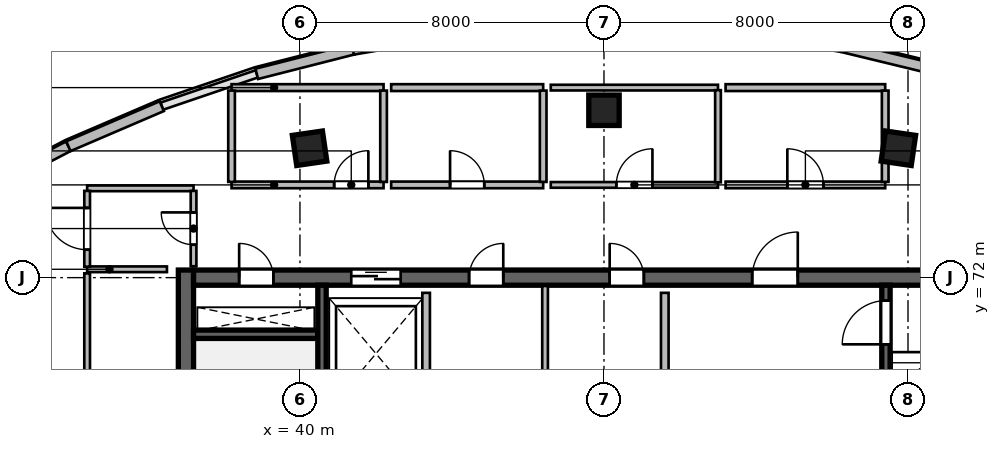
"""IFC4 building model, lengths in metres.
Left out: names, types, materials, properties, quantities, classifications, styles, units other than length and angle.
Written with IfcOpenShell. Run it as: python <this file> out.ifc"""

import sys

from ifc_helpers import new_model, si_unit, direction, frame, frame_2d, origin, origin_2d, place, context, subcontext, project, spatial, rectangle, extrude, source, transform, mapped, element, fill, save


model = new_model("IFC4")
c1 = context("Model", 3, precision=1e-05, world=origin(), true_north=direction((0.0, 1.0)))
c2 = subcontext(c1, "Body", "Model", "MODEL_VIEW")
j1 = project(units=[si_unit("LENGTHUNIT", "METRE"), si_unit("PLANEANGLEUNIT", "RADIAN")], contexts=[c1])
p1 = place(None, origin())
s1 = spatial("IfcSite", under=j1, at=p1, CompositionType="ELEMENT")
p2 = place(p1, origin())
s2 = spatial("IfcBuilding", under=s1, at=p2, CompositionType="ELEMENT")
p3 = place(p2, frame((0.0, 0.0, 295.2)))
s3 = spatial("IfcBuildingStorey", under=s2, at=p3, CompositionType="ELEMENT", Elevation=295.2)
m1 = source(origin(), c2, "Body", "SweptSolid", [
    extrude(rectangle(XDim=12.0, YDim=0.4, at=frame_2d((6.0, 0.0))), origin(), (0.0, 0.0, 1.0), 3.9),
])
p4 = place(p3, frame((37.0, 60.2, 0.0), z_axis=(0.0, 0.0, 1.0), x_axis=(0.0, 1.0, 0.0)))
e1 = element("IfcWall", 1, at=p4, inside=s3, PredefinedType="SHEAR", context=c2, shape_type="MappedRepresentation", body=[
    mapped(m1, transform((0.0, 0.0, 0.0), scale=1.0)),
])
m2 = source(origin(), c2, "Body", "SweptSolid", [
    extrude(rectangle(XDim=21.6, YDim=0.4, at=frame_2d((10.8, 0.0))), origin(), (0.0, 0.0, 1.0), 3.9),
])
p5 = place(p3, frame((37.2, 72.0, 0.0), z_axis=(0.0, 0.0, 1.0), x_axis=(1.0, 0.0, 0.0)))
e2 = element("IfcWall", 2, at=p5, inside=s3, PredefinedType="SHEAR", context=c2, shape_type="MappedRepresentation", body=[
    mapped(m2, transform((0.0, 0.0, 0.0), scale=1.0)),
])
p6 = place(p5, frame((1.2, 0.0, 0.0)))
e3 = element("IfcOpeningElement", 3, at=p6, cuts=e2, PredefinedType="OPENING", context=c2, shape_type="SweptSolid", body=[
    extrude(rectangle(XDim=0.9, YDim=2.1, at=frame_2d((0.45, 1.05))), frame((0.0, 0.21, 0.0), z_axis=(0.0, -1.0, 0.0), x_axis=(1.0, 0.0, 0.0)), (0.0, 0.0, 1.0), 0.42),
])
p7 = place(p5, frame((14.7, 0.0, 0.0)))
e4 = element("IfcOpeningElement", 4, at=p7, cuts=e2, PredefinedType="OPENING", context=c2, shape_type="SweptSolid", body=[
    extrude(rectangle(XDim=1.2, YDim=2.15, at=frame_2d((0.6, 1.075))), frame((0.0, 0.21, 0.0), z_axis=(0.0, -1.0, 0.0), x_axis=(1.0, 0.0, 0.0)), (0.0, 0.0, 1.0), 0.42),
])
p8 = place(p5, frame((4.15, 0.0, 0.0)))
e5 = element("IfcOpeningElement", 5, at=p8, cuts=e2, PredefinedType="OPENING", context=c2, shape_type="SweptSolid", body=[
    extrude(rectangle(XDim=1.3, YDim=2.15, at=frame_2d((0.65, 1.075))), frame((0.0, 0.21, 0.0), z_axis=(0.0, -1.0, 0.0), x_axis=(1.0, 0.0, 0.0)), (0.0, 0.0, 1.0), 0.42),
])
p9 = place(p5, frame((7.25, 0.0, 0.0)))
e6 = element("IfcOpeningElement", 6, at=p9, cuts=e2, PredefinedType="OPENING", context=c2, shape_type="SweptSolid", body=[
    extrude(rectangle(XDim=0.9, YDim=2.1, at=frame_2d((0.45, 1.05))), frame((0.0, 0.21, 0.0), z_axis=(0.0, -1.0, 0.0), x_axis=(1.0, 0.0, 0.0)), (0.0, 0.0, 1.0), 0.42),
])
p10 = place(p5, frame((10.95, 0.0, 0.0)))
e7 = element("IfcOpeningElement", 7, at=p10, cuts=e2, PredefinedType="OPENING", context=c2, shape_type="SweptSolid", body=[
    extrude(rectangle(XDim=0.9, YDim=2.1, at=frame_2d((0.45, 1.05))), frame((0.0, 0.21, 0.0), z_axis=(0.0, -1.0, 0.0), x_axis=(1.0, 0.0, 0.0)), (0.0, 0.0, 1.0), 0.42),
])
m3 = source(origin(), c2, "Body", "SweptSolid", [
    extrude(rectangle(XDim=3.27, YDim=0.22, at=frame_2d((1.635, 0.0))), origin(), (0.0, 0.0, 1.0), 3.9),
])
p11 = place(p3, frame((37.2, 70.51, 0.0), z_axis=(0.0, 0.0, 1.0), x_axis=(1.0, 0.0, 0.0)))
e8 = element("IfcWall", 8, at=p11, inside=s3, PredefinedType="SHEAR", context=c2, shape_type="MappedRepresentation", body=[
    mapped(m3, transform((0.0, 0.0, 0.0), scale=1.0)),
])
m4 = source(origin(), c2, "Body", "SweptSolid", [
    extrude(rectangle(XDim=11.2, YDim=0.22, at=frame_2d((5.6, 0.0))), origin(), (0.0, 0.0, 1.0), 3.9),
])
p12 = place(p3, frame((40.58, 60.6, 0.0), z_axis=(0.0, 0.0, 1.0), x_axis=(0.0, 1.0, 0.0)))
e9 = element("IfcWall", 9, at=p12, inside=s3, PredefinedType="SHEAR", context=c2, shape_type="MappedRepresentation", body=[
    mapped(m4, transform((0.0, 0.0, 0.0), scale=1.0)),
])
p13 = place(p3, frame((55.42, 60.6, 0.0), z_axis=(0.0, 0.0, 1.0), x_axis=(0.0, 1.0, 0.0)))
e10 = element("IfcWall", 10, at=p13, inside=s3, PredefinedType="SHEAR", context=c2, shape_type="MappedRepresentation", body=[
    mapped(m4, transform((0.0, 0.0, 0.0), scale=1.0)),
])
p14 = place(p13, frame((9.645, 0.0, 0.0)))
e11 = element("IfcOpeningElement", 11, at=p14, cuts=e10, PredefinedType="OPENING", context=c2, shape_type="SweptSolid", body=[
    extrude(rectangle(XDim=1.15, YDim=2.15, at=frame_2d((0.575, 1.075))), frame((0.0, 0.12, 0.0), z_axis=(0.0, -1.0, 0.0), x_axis=(1.0, 0.0, 0.0)), (0.0, 0.0, 1.0), 0.24),
])
m5 = source(origin(), c2, "Body", "SweptSolid", [
    extrude(rectangle(XDim=0.8, YDim=0.8, at=origin_2d()), origin(), (0.0, 0.0, 1.0), 3.9),
])
for number, where, z_axis, x_axis in (
    (12, (40.253, 75.404, 0.0), (0.0, 0.0, 1.0), (-0.143, 0.99, 0.0)),
    (13, (48.0, 76.404, 0.0), (0.0, 0.0, 1.0), (0.0, 1.0, 0.0)),
    (14, (55.747, 75.404, 0.0), (0.0, 0.0, 1.0), (0.143, 0.99, 0.0)),
):
    element("IfcColumn", number, at=place(p3, frame(where, z_axis=z_axis, x_axis=x_axis)), inside=s3, PredefinedType="COLUMN", context=c2, shape_type="MappedRepresentation", body=[
        mapped(m5, transform((0.0, 0.0, 0.0), scale=1.0)),
    ])
m6 = source(origin(), c2, "Body", "SweptSolid", [
    extrude(rectangle(XDim=2.711, YDim=0.28, at=frame_2d((1.356, 0.0))), origin(), (0.0, 0.0, 1.0), 3.64),
])
p15 = place(p3, frame((31.502, 74.205, 0.0), z_axis=(0.0, 0.0, 1.0), x_axis=(0.886828760751, 0.462098202881, 0.0)))
e15 = element("IfcWall", 15, at=p15, inside=s3, PredefinedType="SOLIDWALL", context=c2, shape_type="MappedRepresentation", body=[
    mapped(m6, transform((0.0, 0.0, 0.0), scale=1.0)),
])
m7 = source(origin(), c2, "Body", "SweptSolid", [
    extrude(rectangle(XDim=2.673, YDim=0.28, at=frame_2d((1.337, 0.0))), origin(), (0.0, 0.0, 1.0), 3.64),
])
p16 = place(p3, frame((33.907, 75.458, 0.0), z_axis=(0.0, 0.0, 1.0), x_axis=(0.919036345912, 0.394172798266, 0.0)))
e16 = element("IfcWall", 16, at=p16, inside=s3, PredefinedType="SOLIDWALL", context=c2, shape_type="MappedRepresentation", body=[
    mapped(m7, transform((0.0, 0.0, 0.0), scale=1.0)),
])
m8 = source(origin(), c2, "Body", "SweptSolid", [
    extrude(rectangle(XDim=2.614, YDim=0.28, at=frame_2d((1.307, 0.0))), origin(), (0.0, 0.0, 1.0), 3.64),
])
p17 = place(p3, frame((38.863, 77.362, 0.0), z_axis=(0.0, 0.0, 1.0), x_axis=(0.969106509315, 0.246642602978, 0.0)))
e17 = element("IfcWall", 17, at=p17, inside=s3, PredefinedType="SOLIDWALL", context=c2, shape_type="MappedRepresentation", body=[
    mapped(m8, transform((0.0, 0.0, 0.0), scale=1.0)),
])
m9 = source(origin(), c2, "Body", "SweptSolid", [
    extrude(rectangle(XDim=2.594, YDim=0.28, at=frame_2d((1.297, 0.0))), origin(), (0.0, 0.0, 1.0), 3.64),
])
p18 = place(p3, frame((41.397, 78.007, 0.0), z_axis=(0.0, 0.0, 1.0), x_axis=(0.985792341502, 0.167968626344, 0.0)))
e18 = element("IfcWall", 18, at=p18, inside=s3, PredefinedType="SOLIDWALL", context=c2, shape_type="MappedRepresentation", body=[
    mapped(m9, transform((0.0, 0.0, 0.0), scale=1.0)),
])
m10 = source(origin(), c2, "Body", "SweptSolid", [
    extrude(rectangle(XDim=2.611, YDim=0.28, at=frame_2d((1.305, 0.0))), origin(), (0.0, 0.0, 1.0), 3.64),
])
p19 = place(p3, frame((54.239, 78.082, 0.0), z_axis=(0.0, 0.0, 1.0), x_axis=(0.97188253817, -0.235466201396, 0.0)))
e19 = element("IfcWall", 19, at=p19, inside=s3, PredefinedType="SOLIDWALL", context=c2, shape_type="MappedRepresentation", body=[
    mapped(m10, transform((0.0, 0.0, 0.0), scale=1.0)),
])
m11 = source(origin(), c2, "Body", "SweptSolid", [
    extrude(rectangle(XDim=5.8, YDim=0.2, at=frame_2d((2.9, 0.0))), origin(), (0.0, 0.0, 1.0), 3.64),
])
p20 = place(p3, frame((49.6, 65.8, 0.0), z_axis=(0.0, 0.0, 1.0), x_axis=(0.0, 1.0, 0.0)))
e20 = element("IfcWall", 20, at=p20, inside=s3, PredefinedType="SOLIDWALL", context=c2, shape_type="MappedRepresentation", body=[
    mapped(m11, transform((0.0, 0.0, 0.0), scale=1.0)),
])
m12 = source(origin(), c2, "Body", "SweptSolid", [
    extrude(rectangle(XDim=3.2, YDim=0.2, at=frame_2d((1.6, 0.0))), origin(), (0.0, 0.0, 1.0), 3.64),
])
p21 = place(p3, frame((43.32, 68.4, 0.0), z_axis=(0.0, 0.0, 1.0), x_axis=(0.0, 1.0, 0.0)))
e21 = element("IfcWall", 21, at=p21, inside=s3, PredefinedType="SOLIDWALL", context=c2, shape_type="MappedRepresentation", body=[
    mapped(m12, transform((0.0, 0.0, 0.0), scale=1.0)),
])
m13 = source(origin(), c2, "Body", "SweptSolid", [
    extrude(rectangle(XDim=3.38, YDim=0.15, at=frame_2d((1.69, 0.0))), origin(), (0.0, 0.0, 1.0), 3.64),
])
p22 = place(p3, frame((46.45, 68.4, 0.0), z_axis=(0.0, 0.0, 1.0), x_axis=(0.0, 1.0, 0.0)))
e22 = element("IfcWall", 22, at=p22, inside=s3, PredefinedType="PARTITIONING", context=c2, shape_type="MappedRepresentation", body=[
    mapped(m13, transform((0.0, 0.0, 0.0), scale=1.0)),
])
m14 = source(origin(), c2, "Body", "SweptSolid", [
    extrude(rectangle(XDim=2.1, YDim=0.15, at=frame_2d((1.05, 0.0))), origin(), (0.0, 0.0, 1.0), 3.64),
])
p23 = place(p3, frame((34.4, 72.22, 0.0), z_axis=(0.0, 0.0, 1.0), x_axis=(1.0, 0.0, 0.0)))
e23 = element("IfcWall", 23, at=p23, inside=s3, PredefinedType="PARTITIONING", context=c2, shape_type="MappedRepresentation", body=[
    mapped(m14, transform((0.0, 0.0, 0.0), scale=1.0)),
])
m15 = source(origin(), c2, "Body", "SweptSolid", [
    extrude(rectangle(XDim=2.8, YDim=0.15, at=frame_2d((1.4, 0.0))), origin(), (0.0, 0.0, 1.0), 3.64),
])
p24 = place(p3, frame((34.4, 74.35, 0.0), z_axis=(0.0, 0.0, 1.0), x_axis=(1.0, 0.0, 0.0)))
e24 = element("IfcWall", 24, at=p24, inside=s3, PredefinedType="PARTITIONING", context=c2, shape_type="MappedRepresentation", body=[
    mapped(m15, transform((0.0, 0.0, 0.0), scale=1.0)),
])
m16 = source(origin(), c2, "Body", "SweptSolid", [
    extrude(rectangle(XDim=1.995, YDim=0.15, at=frame_2d((0.998, 0.0))), origin(), (0.0, 0.0, 1.0), 3.64),
])
p25 = place(p3, frame((34.4, 72.288, 0.0), z_axis=(0.0, 0.0, 1.0), x_axis=(0.0, 1.0, 0.0)))
e25 = element("IfcWall", 25, at=p25, inside=s3, PredefinedType="PARTITIONING", context=c2, shape_type="MappedRepresentation", body=[
    mapped(m16, transform((0.0, 0.0, 0.0), scale=1.0)),
])
p26 = place(p25, frame((0.448, 0.0, 0.0)))
e26 = element("IfcOpeningElement", 26, at=p26, cuts=e25, PredefinedType="OPENING", context=c2, shape_type="SweptSolid", body=[
    extrude(rectangle(XDim=1.1, YDim=2.15, at=frame_2d((0.55, 1.075))), frame((0.0, 0.085, 0.0), z_axis=(0.0, -1.0, 0.0), x_axis=(1.0, 0.0, 0.0)), (0.0, 0.0, 1.0), 0.17),
])
m17 = source(origin(), c2, "Body", "SweptSolid", [
    extrude(rectangle(XDim=1.982, YDim=0.15, at=frame_2d((0.991, 0.0))), origin(), (0.0, 0.0, 1.0), 3.64),
])
p27 = place(p3, frame((37.2, 72.3, 0.0), z_axis=(0.0, 0.0, 1.0), x_axis=(0.0, 1.0, 0.0)))
e27 = element("IfcWall", 27, at=p27, inside=s3, PredefinedType="PARTITIONING", context=c2, shape_type="MappedRepresentation", body=[
    mapped(m17, transform((0.0, 0.0, 0.0), scale=1.0)),
])
p28 = place(p27, frame((0.566, 0.0, 0.0)))
e28 = element("IfcOpeningElement", 28, at=p28, cuts=e27, PredefinedType="OPENING", context=c2, shape_type="SweptSolid", body=[
    extrude(rectangle(XDim=0.85, YDim=2.1, at=frame_2d((0.425, 1.05))), frame((0.0, 0.085, 0.0), z_axis=(0.0, -1.0, 0.0), x_axis=(1.0, 0.0, 0.0)), (0.0, 0.0, 1.0), 0.17),
])
m18 = source(origin(), c2, "Body", "SweptSolid", [
    extrude(rectangle(XDim=3.845, YDim=0.15, at=frame_2d((1.922, 0.0))), origin(), (0.0, 0.0, 1.0), 3.64),
])
p29 = place(p3, frame((34.4, 68.268, 0.0), z_axis=(0.0, 0.0, 1.0), x_axis=(0.0, 1.0, 0.0)))
e29 = element("IfcWall", 29, at=p29, inside=s3, PredefinedType="PARTITIONING", context=c2, shape_type="MappedRepresentation", body=[
    mapped(m18, transform((0.0, 0.0, 0.0), scale=1.0)),
])
m19 = source(origin(), c2, "Body", "SweptSolid", [
    extrude(rectangle(XDim=4.0, YDim=0.175, at=frame_2d((2.0, 0.0))), origin(), (0.0, 0.0, 1.0), 3.64),
])
p30 = place(p3, frame((38.2, 74.44, 0.0), z_axis=(0.0, 0.0, 1.0), x_axis=(1.0, 0.0, 0.0)))
e30 = element("IfcWall", 30, at=p30, inside=s3, PredefinedType="PARTITIONING", context=c2, shape_type="MappedRepresentation", body=[
    mapped(m19, transform((0.0, 0.0, 0.0), scale=1.0)),
])
p31 = place(p30, frame((2.7, 0.0, 0.0)))
e31 = element("IfcOpeningElement", 31, at=p31, cuts=e30, PredefinedType="OPENING", context=c2, shape_type="SweptSolid", body=[
    extrude(rectangle(XDim=0.9, YDim=2.08, at=frame_2d((0.45, 1.04))), frame((0.0, 0.098, 0.0), z_axis=(0.0, -1.0, 0.0), x_axis=(1.0, 0.0, 0.0)), (0.0, 0.0, 1.0), 0.195),
])
m20 = source(origin(), c2, "Body", "SweptSolid", [
    extrude(rectangle(XDim=4.0, YDim=0.18, at=frame_2d((2.0, 0.0))), origin(), (0.0, 0.0, 1.0), 3.64),
])
p32 = place(p3, frame((38.2, 77.0, 0.0), z_axis=(0.0, 0.0, 1.0), x_axis=(1.0, 0.0, 0.0)))
e32 = element("IfcWall", 32, at=p32, inside=s3, PredefinedType="PLUMBINGWALL", context=c2, shape_type="MappedRepresentation", body=[
    mapped(m20, transform((0.0, 0.0, 0.0), scale=1.0)),
])
m21 = source(origin(), c2, "Body", "SweptSolid", [
    extrude(rectangle(XDim=2.403, YDim=0.175, at=frame_2d((1.201, 0.0))), origin(), (0.0, 0.0, 1.0), 3.64),
])
for number, where, z_axis, x_axis in (
    (33, (38.2, 74.519, 0.0), (0.0, 0.0, 1.0), (0.0, 1.0, 0.0)),
    (34, (42.2, 74.519, 0.0), (0.0, 0.0, 1.0), (0.0, 1.0, 0.0)),
):
    element("IfcWall", number, at=place(p3, frame(where, z_axis=z_axis, x_axis=x_axis)), inside=s3, PredefinedType="PARTITIONING", context=c2, shape_type="MappedRepresentation", body=[
        mapped(m21, transform((0.0, 0.0, 0.0), scale=1.0)),
    ])
p33 = place(p3, frame((42.4, 74.44, 0.0), z_axis=(0.0, 0.0, 1.0), x_axis=(1.0, 0.0, 0.0)))
e35 = element("IfcWall", 35, at=p33, inside=s3, PredefinedType="PARTITIONING", context=c2, shape_type="MappedRepresentation", body=[
    mapped(m19, transform((0.0, 0.0, 0.0), scale=1.0)),
])
p34 = place(p33, frame((1.55, 0.0, 0.0)))
e36 = element("IfcOpeningElement", 36, at=p34, cuts=e35, PredefinedType="OPENING", context=c2, shape_type="SweptSolid", body=[
    extrude(rectangle(XDim=0.9, YDim=2.08, at=frame_2d((0.45, 1.04))), frame((0.0, 0.098, 0.0), z_axis=(0.0, -1.0, 0.0), x_axis=(1.0, 0.0, 0.0)), (0.0, 0.0, 1.0), 0.195),
])
p35 = place(p3, frame((42.4, 77.0, 0.0), z_axis=(0.0, 0.0, 1.0), x_axis=(1.0, 0.0, 0.0)))
e37 = element("IfcWall", 37, at=p35, inside=s3, PredefinedType="PLUMBINGWALL", context=c2, shape_type="MappedRepresentation", body=[
    mapped(m20, transform((0.0, 0.0, 0.0), scale=1.0)),
])
p36 = place(p3, frame((46.4, 74.519, 0.0), z_axis=(0.0, 0.0, 1.0), x_axis=(0.0, 1.0, 0.0)))
e38 = element("IfcWall", 38, at=p36, inside=s3, PredefinedType="PARTITIONING", context=c2, shape_type="MappedRepresentation", body=[
    mapped(m21, transform((0.0, 0.0, 0.0), scale=1.0)),
])
m22 = source(origin(), c2, "Body", "SweptSolid", [
    extrude(rectangle(XDim=4.4, YDim=0.15, at=frame_2d((2.2, 0.0))), origin(), (0.0, 0.0, 1.0), 3.64),
])
p37 = place(p3, frame((46.6, 74.44, 0.0), z_axis=(0.0, 0.0, 1.0), x_axis=(1.0, 0.0, 0.0)))
e39 = element("IfcWall", 39, at=p37, inside=s3, PredefinedType="PARTITIONING", context=c2, shape_type="MappedRepresentation", body=[
    mapped(m22, transform((0.0, 0.0, 0.0), scale=1.0)),
])
p38 = place(p37, frame((1.725, 0.0, 0.0)))
e40 = element("IfcOpeningElement", 40, at=p38, cuts=e39, PredefinedType="OPENING", context=c2, shape_type="SweptSolid", body=[
    extrude(rectangle(XDim=0.95, YDim=2.1, at=frame_2d((0.475, 1.05))), frame((0.0, 0.085, 0.0), z_axis=(0.0, -1.0, 0.0), x_axis=(1.0, 0.0, 0.0)), (0.0, 0.0, 1.0), 0.17),
])
p39 = place(p3, frame((46.6, 77.0, 0.0), z_axis=(0.0, 0.0, 1.0), x_axis=(1.0, 0.0, 0.0)))
e41 = element("IfcWall", 41, at=p39, inside=s3, PredefinedType="PARTITIONING", context=c2, shape_type="MappedRepresentation", body=[
    mapped(m22, transform((0.0, 0.0, 0.0), scale=1.0)),
])
m23 = source(origin(), c2, "Body", "SweptSolid", [
    extrude(rectangle(XDim=2.425, YDim=0.15, at=frame_2d((1.212, 0.0))), origin(), (0.0, 0.0, 1.0), 3.64),
])
p40 = place(p3, frame((51.0, 74.508, 0.0), z_axis=(0.0, 0.0, 1.0), x_axis=(0.0, 1.0, 0.0)))
e42 = element("IfcWall", 42, at=p40, inside=s3, PredefinedType="PARTITIONING", context=c2, shape_type="MappedRepresentation", body=[
    mapped(m23, transform((0.0, 0.0, 0.0), scale=1.0)),
])
m24 = source(origin(), c2, "Body", "SweptSolid", [
    extrude(rectangle(XDim=4.2, YDim=0.175, at=frame_2d((2.1, 0.0))), origin(), (0.0, 0.0, 1.0), 3.64),
])
p41 = place(p3, frame((51.2, 74.44, 0.0), z_axis=(0.0, 0.0, 1.0), x_axis=(1.0, 0.0, 0.0)))
e43 = element("IfcWall", 43, at=p41, inside=s3, PredefinedType="PARTITIONING", context=c2, shape_type="MappedRepresentation", body=[
    mapped(m24, transform((0.0, 0.0, 0.0), scale=1.0)),
])
p42 = place(p41, frame((1.625, 0.0, 0.0)))
e44 = element("IfcOpeningElement", 44, at=p42, cuts=e43, PredefinedType="OPENING", context=c2, shape_type="SweptSolid", body=[
    extrude(rectangle(XDim=0.95, YDim=2.12, at=frame_2d((0.475, 1.06))), frame((0.0, 0.098, 0.0), z_axis=(0.0, -1.0, 0.0), x_axis=(1.0, 0.0, 0.0)), (0.0, 0.0, 1.0), 0.195),
])
m25 = source(origin(), c2, "Body", "SweptSolid", [
    extrude(rectangle(XDim=4.2, YDim=0.18, at=frame_2d((2.1, 0.0))), origin(), (0.0, 0.0, 1.0), 3.64),
])
p43 = place(p3, frame((51.2, 77.0, 0.0), z_axis=(0.0, 0.0, 1.0), x_axis=(1.0, 0.0, 0.0)))
e45 = element("IfcWall", 45, at=p43, inside=s3, PredefinedType="PLUMBINGWALL", context=c2, shape_type="MappedRepresentation", body=[
    mapped(m25, transform((0.0, 0.0, 0.0), scale=1.0)),
])
p44 = place(p3, frame((55.4, 74.519, 0.0), z_axis=(0.0, 0.0, 1.0), x_axis=(0.0, 1.0, 0.0)))
e46 = element("IfcWall", 46, at=p44, inside=s3, PredefinedType="PARTITIONING", context=c2, shape_type="MappedRepresentation", body=[
    mapped(m21, transform((0.0, 0.0, 0.0), scale=1.0)),
])
m26 = source(origin(), c2, "Body", "SweptSolid", [
    extrude(rectangle(XDim=0.9, YDim=2.1, at=frame_2d((0.45, 1.05))), frame((0.0, 0.025, 0.0), z_axis=(0.0, -1.0, 0.0), x_axis=(1.0, 0.0, 0.0)), (0.0, 0.0, 1.0), 0.05),
])
p45 = place(p6, origin())
e47 = element("IfcDoor", 47, at=p45, inside=s3, OperationType="SINGLE_SWING_LEFT", PredefinedType="DOOR", context=c2, shape_type="MappedRepresentation", body=[
    mapped(m26, transform((0.0, 0.0, 0.0), scale=1.0)),
])
fill(e3, e47)
m27 = source(origin(), c2, "Body", "SweptSolid", [
    extrude(rectangle(XDim=1.15, YDim=2.15, at=frame_2d((0.575, 1.075))), frame((0.0, 0.025, 0.0), z_axis=(0.0, -1.0, 0.0), x_axis=(1.0, 0.0, 0.0)), (0.0, 0.0, 1.0), 0.05),
])
p46 = place(p14, origin())
e48 = element("IfcDoor", 48, at=p46, inside=s3, OperationType="SINGLE_SWING_LEFT", PredefinedType="DOOR", context=c2, shape_type="MappedRepresentation", body=[
    mapped(m27, transform((0.0, 0.0, 0.0), scale=1.0)),
])
fill(e11, e48)
m28 = source(origin(), c2, "Body", "SweptSolid", [
    extrude(rectangle(XDim=1.2, YDim=2.15, at=frame_2d((0.6, 1.075))), frame((0.0, 0.025, 0.0), z_axis=(0.0, -1.0, 0.0), x_axis=(1.0, 0.0, 0.0)), (0.0, 0.0, 1.0), 0.05),
])
p47 = place(p7, origin())
e49 = element("IfcDoor", 49, at=p47, inside=s3, OperationType="SINGLE_SWING_RIGHT", PredefinedType="DOOR", context=c2, shape_type="MappedRepresentation", body=[
    mapped(m28, transform((0.0, 0.0, 0.0), scale=1.0)),
])
fill(e4, e49)
m29 = source(origin(), c2, "Body", "SweptSolid", [
    extrude(rectangle(XDim=1.3, YDim=2.15, at=frame_2d((0.65, 1.075))), frame((0.0, 0.025, 0.0), z_axis=(0.0, -1.0, 0.0), x_axis=(1.0, 0.0, 0.0)), (0.0, 0.0, 1.0), 0.05),
])
p48 = place(p8, origin())
e50 = element("IfcDoor", 50, at=p48, inside=s3, OperationType="DOUBLE_DOOR_SLIDING", PredefinedType="DOOR", context=c2, shape_type="MappedRepresentation", body=[
    mapped(m29, transform((0.0, 0.0, 0.0), scale=1.0)),
])
fill(e5, e50)
p49 = place(p9, origin())
e51 = element("IfcDoor", 51, at=p49, inside=s3, OperationType="SINGLE_SWING_RIGHT", PredefinedType="DOOR", context=c2, shape_type="MappedRepresentation", body=[
    mapped(m26, transform((0.0, 0.0, 0.0), scale=1.0)),
])
fill(e6, e51)
p50 = place(p10, origin())
e52 = element("IfcDoor", 52, at=p50, inside=s3, OperationType="SINGLE_SWING_LEFT", PredefinedType="DOOR", context=c2, shape_type="MappedRepresentation", body=[
    mapped(m26, transform((0.0, 0.0, 0.0), scale=1.0)),
])
fill(e7, e52)
m30 = source(origin(), c2, "Body", "SweptSolid", [
    extrude(rectangle(XDim=0.85, YDim=2.1, at=frame_2d((0.425, 1.05))), frame((0.0, 0.025, 0.0), z_axis=(0.0, -1.0, 0.0), x_axis=(1.0, 0.0, 0.0)), (0.0, 0.0, 1.0), 0.05),
])
p51 = place(p28, origin())
e53 = element("IfcDoor", 53, at=p51, inside=s3, OperationType="SINGLE_SWING_RIGHT", PredefinedType="DOOR", context=c2, shape_type="MappedRepresentation", body=[
    mapped(m30, transform((0.0, 0.0, 0.0), scale=1.0)),
])
fill(e28, e53)
m31 = source(origin(), c2, "Body", "SweptSolid", [
    extrude(rectangle(XDim=0.9, YDim=2.08, at=frame_2d((0.45, 1.04))), frame((0.0, 0.025, 0.0), z_axis=(0.0, -1.0, 0.0), x_axis=(1.0, 0.0, 0.0)), (0.0, 0.0, 1.0), 0.05),
])
p52 = place(p31, origin())
e54 = element("IfcDoor", 54, at=p52, inside=s3, OperationType="SINGLE_SWING_RIGHT", PredefinedType="DOOR", context=c2, shape_type="MappedRepresentation", body=[
    mapped(m31, transform((0.0, 0.0, 0.0), scale=1.0)),
])
fill(e31, e54)
p53 = place(p34, origin())
e55 = element("IfcDoor", 55, at=p53, inside=s3, OperationType="SINGLE_SWING_LEFT", PredefinedType="DOOR", context=c2, shape_type="MappedRepresentation", body=[
    mapped(m31, transform((0.0, 0.0, 0.0), scale=1.0)),
])
fill(e36, e55)
m32 = source(origin(), c2, "Body", "SweptSolid", [
    extrude(rectangle(XDim=0.95, YDim=2.1, at=frame_2d((0.475, 1.05))), frame((0.0, 0.025, 0.0), z_axis=(0.0, -1.0, 0.0), x_axis=(1.0, 0.0, 0.0)), (0.0, 0.0, 1.0), 0.05),
])
p54 = place(p38, origin())
e56 = element("IfcDoor", 56, at=p54, inside=s3, OperationType="SINGLE_SWING_RIGHT", PredefinedType="DOOR", context=c2, shape_type="MappedRepresentation", body=[
    mapped(m32, transform((0.0, 0.0, 0.0), scale=1.0)),
])
fill(e40, e56)
m33 = source(origin(), c2, "Body", "SweptSolid", [
    extrude(rectangle(XDim=0.95, YDim=2.12, at=frame_2d((0.475, 1.06))), frame((0.0, 0.025, 0.0), z_axis=(0.0, -1.0, 0.0), x_axis=(1.0, 0.0, 0.0)), (0.0, 0.0, 1.0), 0.05),
])
p55 = place(p42, origin())
e57 = element("IfcDoor", 57, at=p55, inside=s3, OperationType="SINGLE_SWING_LEFT", PredefinedType="DOOR", context=c2, shape_type="MappedRepresentation", body=[
    mapped(m33, transform((0.0, 0.0, 0.0), scale=1.0)),
])
fill(e44, e57)
m34 = source(origin(), c2, "Body", "SweptSolid", [
    extrude(rectangle(XDim=1.1, YDim=2.15, at=frame_2d((0.55, 1.075))), frame((0.0, 0.025, 0.0), z_axis=(0.0, -1.0, 0.0), x_axis=(1.0, 0.0, 0.0)), (0.0, 0.0, 1.0), 0.05),
])
p56 = place(p26, origin())
e58 = element("IfcDoor", 58, at=p56, inside=s3, OperationType="SINGLE_SWING_RIGHT", PredefinedType="DOOR", context=c2, shape_type="MappedRepresentation", body=[
    mapped(m34, transform((0.0, 0.0, 0.0), scale=1.0)),
])
fill(e26, e58)
save(model, sys.argv[1])
